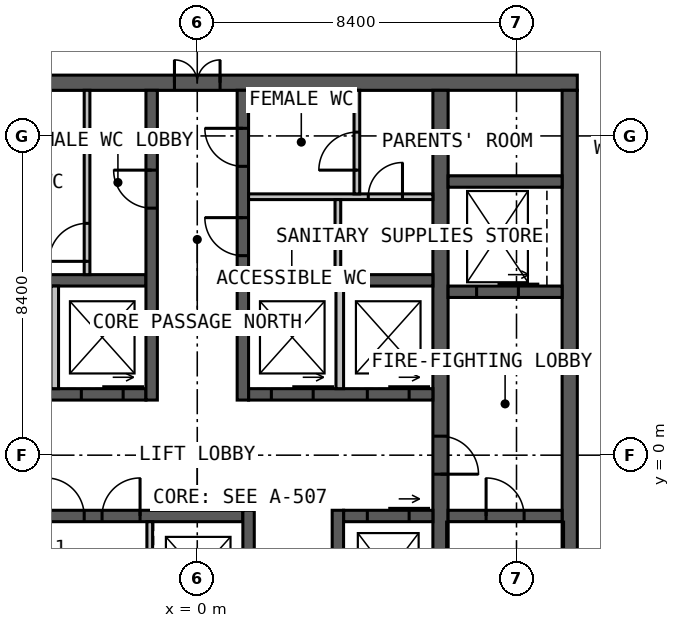
"""IFC4 building model, lengths in metres.
Left out: names, types, materials, properties, quantities, classifications, styles, units other than length and angle.
Written with IfcOpenShell. Run it as: python <this file> out.ifc"""

import sys

from ifc_helpers import new_model, si_unit, direction, frame, frame_2d, origin, place, context, subcontext, project, spatial, rectangle, extrude, element, fill, save


model = new_model("IFC4")
c1 = context("Model", 3, precision=1e-05, world=origin(), true_north=direction((0.0, 1.0)))
c2 = subcontext(c1, "Body", "Model", "MODEL_VIEW")
j1 = project(units=[si_unit("LENGTHUNIT", "METRE"), si_unit("PLANEANGLEUNIT", "RADIAN")], contexts=[c1])
p1 = place(None, origin())
s1 = spatial("IfcSite", under=j1, at=p1, CompositionType="ELEMENT")
p2 = place(p1, origin())
s2 = spatial("IfcBuilding", under=s1, at=p2, CompositionType="ELEMENT")
p3 = place(p2, frame((0.0, 0.0, 272.0)))
s3 = spatial("IfcBuildingStorey", under=s2, at=p3, CompositionType="ELEMENT", Elevation=272.0)
p4 = place(p3, frame((-10.0, 9.8, 0.0), z_axis=(0.0, 0.0, 1.0), x_axis=(1.0, 0.0, 0.0)))
e1 = element("IfcWall", 1, at=p4, inside=s3, PredefinedType="SOLIDWALL", context=c2, shape_type="SweptSolid", body=[
    extrude(rectangle(XDim=20.0, YDim=0.4, at=frame_2d((10.0, 0.0))), origin(), (0.0, 0.0, 1.0), 4.0),
])
p5 = place(p4, frame((9.4, 0.0, 0.0)))
e2 = element("IfcOpeningElement", 2, at=p5, cuts=e1, PredefinedType="OPENING", context=c2, shape_type="SweptSolid", body=[
    extrude(rectangle(XDim=1.2, YDim=2.2, at=frame_2d((0.6, 1.1))), frame((0.0, 0.21, 0.0), z_axis=(0.0, -1.0, 0.0), x_axis=(1.0, 0.0, 0.0)), (0.0, 0.0, 1.0), 0.42),
])
p6 = place(p3, frame((9.8, -9.6, 0.0), z_axis=(0.0, 0.0, 1.0), x_axis=(0.0, 1.0, 0.0)))
e3 = element("IfcWall", 3, at=p6, inside=s3, PredefinedType="SOLIDWALL", context=c2, shape_type="SweptSolid", body=[
    extrude(rectangle(XDim=19.2, YDim=0.4, at=frame_2d((9.6, 0.0))), origin(), (0.0, 0.0, 1.0), 4.0),
])
p7 = place(p3, frame((6.4, 9.6, 0.0), z_axis=(0.0, 0.0, 1.0), x_axis=(0.0, -1.0, 0.0)))
e4 = element("IfcWall", 4, at=p7, inside=s3, PredefinedType="SOLIDWALL", context=c2, shape_type="SweptSolid", body=[
    extrude(rectangle(XDim=19.2, YDim=0.4, at=frame_2d((9.6, 0.0))), origin(), (0.0, 0.0, 1.0), 4.0),
])
p8 = place(p7, frame((9.1, 0.0, 0.0)))
e5 = element("IfcOpeningElement", 5, at=p8, cuts=e4, PredefinedType="OPENING", context=c2, shape_type="SweptSolid", body=[
    extrude(rectangle(XDim=1.0, YDim=2.2, at=frame_2d((0.5, 1.1))), frame((0.0, 0.21, 0.0), z_axis=(0.0, -1.0, 0.0), x_axis=(1.0, 0.0, 0.0)), (0.0, 0.0, 1.0), 0.42),
])
p9 = place(p3, frame((-6.2, 1.6, 0.0), z_axis=(0.0, 0.0, 1.0), x_axis=(1.0, 0.0, 0.0)))
e6 = element("IfcWall", 6, at=p9, inside=s3, PredefinedType="SOLIDWALL", context=c2, shape_type="SweptSolid", body=[
    extrude(rectangle(XDim=4.85, YDim=0.3, at=frame_2d((2.425, 0.0))), origin(), (0.0, 0.0, 1.0), 4.0),
])
p10 = place(p9, frame((0.625, 0.0, 0.0)))
e7 = element("IfcOpeningElement", 7, at=p10, cuts=e6, PredefinedType="OPENING", context=c2, shape_type="SweptSolid", body=[
    extrude(rectangle(XDim=1.1, YDim=2.2, at=frame_2d((0.55, 1.1))), frame((0.0, 0.16, 0.0), z_axis=(0.0, -1.0, 0.0), x_axis=(1.0, 0.0, 0.0)), (0.0, 0.0, 1.0), 0.32),
])
p11 = place(p9, frame((3.15, 0.0, 0.0)))
e8 = element("IfcOpeningElement", 8, at=p11, cuts=e6, PredefinedType="OPENING", context=c2, shape_type="SweptSolid", body=[
    extrude(rectangle(XDim=1.1, YDim=2.2, at=frame_2d((0.55, 1.1))), frame((0.0, 0.16, 0.0), z_axis=(0.0, -1.0, 0.0), x_axis=(1.0, 0.0, 0.0)), (0.0, 0.0, 1.0), 0.32),
])
p12 = place(p3, frame((1.35, 1.6, 0.0), z_axis=(0.0, 0.0, 1.0), x_axis=(1.0, 0.0, 0.0)))
e9 = element("IfcWall", 9, at=p12, inside=s3, PredefinedType="SOLIDWALL", context=c2, shape_type="SweptSolid", body=[
    extrude(rectangle(XDim=4.85, YDim=0.3, at=frame_2d((2.425, 0.0))), origin(), (0.0, 0.0, 1.0), 4.0),
])
p13 = place(p12, frame((0.6, 0.0, 0.0)))
e10 = element("IfcOpeningElement", 10, at=p13, cuts=e9, PredefinedType="OPENING", context=c2, shape_type="SweptSolid", body=[
    extrude(rectangle(XDim=1.1, YDim=2.2, at=frame_2d((0.55, 1.1))), frame((0.0, 0.16, 0.0), z_axis=(0.0, -1.0, 0.0), x_axis=(1.0, 0.0, 0.0)), (0.0, 0.0, 1.0), 0.32),
])
p14 = place(p12, frame((3.125, 0.0, 0.0)))
e11 = element("IfcOpeningElement", 11, at=p14, cuts=e9, PredefinedType="OPENING", context=c2, shape_type="SweptSolid", body=[
    extrude(rectangle(XDim=1.1, YDim=2.2, at=frame_2d((0.55, 1.1))), frame((0.0, 0.16, 0.0), z_axis=(0.0, -1.0, 0.0), x_axis=(1.0, 0.0, 0.0)), (0.0, 0.0, 1.0), 0.32),
])
for number, where, z_axis, x_axis in (
    (12, (-6.2, 4.6, 0.0), (0.0, 0.0, 1.0), (1.0, 0.0, 0.0)),
    (13, (1.35, 4.6, 0.0), (0.0, 0.0, 1.0), (1.0, 0.0, 0.0)),
):
    element("IfcWall", number, at=place(p3, frame(where, z_axis=z_axis, x_axis=x_axis)), inside=s3, PredefinedType="SOLIDWALL", context=c2, shape_type="SweptSolid", body=[
        extrude(rectangle(XDim=4.85, YDim=0.3, at=frame_2d((2.425, 0.0))), origin(), (0.0, 0.0, 1.0), 4.0),
    ])
p15 = place(p3, frame((-1.2, 1.45, 0.0), z_axis=(0.0, 0.0, 1.0), x_axis=(0.0, 1.0, 0.0)))
e14 = element("IfcWall", 14, at=p15, inside=s3, PredefinedType="SOLIDWALL", context=c2, shape_type="SweptSolid", body=[
    extrude(rectangle(XDim=8.15, YDim=0.3, at=frame_2d((4.075, 0.0))), origin(), (0.0, 0.0, 1.0), 4.0),
])
p16 = place(p15, frame((5.05, 0.0, 0.0)))
e15 = element("IfcOpeningElement", 15, at=p16, cuts=e14, PredefinedType="OPENING", context=c2, shape_type="SweptSolid", body=[
    extrude(rectangle(XDim=1.0, YDim=2.2, at=frame_2d((0.5, 1.1))), frame((0.0, 0.16, 0.0), z_axis=(0.0, -1.0, 0.0), x_axis=(1.0, 0.0, 0.0)), (0.0, 0.0, 1.0), 0.32),
])
p17 = place(p3, frame((1.2, 1.45, 0.0), z_axis=(0.0, 0.0, 1.0), x_axis=(0.0, 1.0, 0.0)))
e16 = element("IfcWall", 16, at=p17, inside=s3, PredefinedType="SOLIDWALL", context=c2, shape_type="SweptSolid", body=[
    extrude(rectangle(XDim=8.15, YDim=0.3, at=frame_2d((4.075, 0.0))), origin(), (0.0, 0.0, 1.0), 4.0),
])
p18 = place(p17, frame((3.8, 0.0, 0.0)))
e17 = element("IfcOpeningElement", 17, at=p18, cuts=e16, PredefinedType="OPENING", context=c2, shape_type="SweptSolid", body=[
    extrude(rectangle(XDim=1.0, YDim=2.2, at=frame_2d((0.5, 1.1))), frame((0.0, 0.16, 0.0), z_axis=(0.0, -1.0, 0.0), x_axis=(1.0, 0.0, 0.0)), (0.0, 0.0, 1.0), 0.32),
])
p19 = place(p17, frame((6.15, 0.0, 0.0)))
e18 = element("IfcOpeningElement", 18, at=p19, cuts=e16, PredefinedType="OPENING", context=c2, shape_type="SweptSolid", body=[
    extrude(rectangle(XDim=1.0, YDim=2.2, at=frame_2d((0.5, 1.1))), frame((0.0, 0.16, 0.0), z_axis=(0.0, -1.0, 0.0), x_axis=(1.0, 0.0, 0.0)), (0.0, 0.0, 1.0), 0.32),
])
p20 = place(p3, frame((-6.2, -1.6, 0.0), z_axis=(0.0, 0.0, 1.0), x_axis=(1.0, 0.0, 0.0)))
e19 = element("IfcWall", 19, at=p20, inside=s3, PredefinedType="SOLIDWALL", context=c2, shape_type="SweptSolid", body=[
    extrude(rectangle(XDim=7.4, YDim=0.3, at=frame_2d((3.7, 0.0))), origin(), (0.0, 0.0, 1.0), 4.0),
])
p21 = place(p20, frame((0.675, 0.0, 0.0)))
e20 = element("IfcOpeningElement", 20, at=p21, cuts=e19, PredefinedType="OPENING", context=c2, shape_type="SweptSolid", body=[
    extrude(rectangle(XDim=1.0, YDim=2.2, at=frame_2d((0.5, 1.1))), frame((0.0, 0.16, 0.0), z_axis=(0.0, -1.0, 0.0), x_axis=(1.0, 0.0, 0.0)), (0.0, 0.0, 1.0), 0.32),
])
p22 = place(p20, frame((2.225, 0.0, 0.0)))
e21 = element("IfcOpeningElement", 21, at=p22, cuts=e19, PredefinedType="OPENING", context=c2, shape_type="SweptSolid", body=[
    extrude(rectangle(XDim=1.0, YDim=2.2, at=frame_2d((0.5, 1.1))), frame((0.0, 0.16, 0.0), z_axis=(0.0, -1.0, 0.0), x_axis=(1.0, 0.0, 0.0)), (0.0, 0.0, 1.0), 0.32),
])
p23 = place(p20, frame((3.695, 0.0, 0.0)))
e22 = element("IfcOpeningElement", 22, at=p23, cuts=e19, PredefinedType="OPENING", context=c2, shape_type="SweptSolid", body=[
    extrude(rectangle(XDim=1.0, YDim=2.2, at=frame_2d((0.5, 1.1))), frame((0.0, 0.16, 0.0), z_axis=(0.0, -1.0, 0.0), x_axis=(1.0, 0.0, 0.0)), (0.0, 0.0, 1.0), 0.32),
])
p24 = place(p3, frame((3.85, -1.6, 0.0), z_axis=(0.0, 0.0, 1.0), x_axis=(1.0, 0.0, 0.0)))
e23 = element("IfcWall", 23, at=p24, inside=s3, PredefinedType="SOLIDWALL", context=c2, shape_type="SweptSolid", body=[
    extrude(rectangle(XDim=2.35, YDim=0.3, at=frame_2d((1.175, 0.0))), origin(), (0.0, 0.0, 1.0), 4.0),
])
p25 = place(p24, frame((0.625, 0.0, 0.0)))
e24 = element("IfcOpeningElement", 24, at=p25, cuts=e23, PredefinedType="OPENING", context=c2, shape_type="SweptSolid", body=[
    extrude(rectangle(XDim=1.1, YDim=2.2, at=frame_2d((0.55, 1.1))), frame((0.0, 0.16, 0.0), z_axis=(0.0, -1.0, 0.0), x_axis=(1.0, 0.0, 0.0)), (0.0, 0.0, 1.0), 0.32),
])
p26 = place(p3, frame((1.35, -1.45, 0.0), z_axis=(0.0, 0.0, 1.0), x_axis=(0.0, -1.0, 0.0)))
e25 = element("IfcWall", 25, at=p26, inside=s3, PredefinedType="SOLIDWALL", context=c2, shape_type="SweptSolid", body=[
    extrude(rectangle(XDim=8.15, YDim=0.3, at=frame_2d((4.075, 0.0))), origin(), (0.0, 0.0, 1.0), 4.0),
])
p27 = place(p26, frame((6.0, 0.0, 0.0)))
e26 = element("IfcOpeningElement", 26, at=p27, cuts=e25, PredefinedType="OPENING", context=c2, shape_type="SweptSolid", body=[
    extrude(rectangle(XDim=1.0, YDim=2.2, at=frame_2d((0.5, 1.1))), frame((0.0, 0.16, 0.0), z_axis=(0.0, -1.0, 0.0), x_axis=(1.0, 0.0, 0.0)), (0.0, 0.0, 1.0), 0.32),
])
p28 = place(p26, frame((3.525, 0.0, 0.0)))
e27 = element("IfcOpeningElement", 27, at=p28, cuts=e25, PredefinedType="OPENING", context=c2, shape_type="SweptSolid", body=[
    extrude(rectangle(XDim=0.9, YDim=2.2, at=frame_2d((0.45, 1.1))), frame((0.0, 0.16, 0.0), z_axis=(0.0, -1.0, 0.0), x_axis=(1.0, 0.0, 0.0)), (0.0, 0.0, 1.0), 0.32),
])
p29 = place(p3, frame((3.7, -1.45, 0.0), z_axis=(0.0, 0.0, 1.0), x_axis=(0.0, -1.0, 0.0)))
e28 = element("IfcWall", 28, at=p29, inside=s3, PredefinedType="SOLIDWALL", context=c2, shape_type="SweptSolid", body=[
    extrude(rectangle(XDim=8.15, YDim=0.3, at=frame_2d((4.075, 0.0))), origin(), (0.0, 0.0, 1.0), 4.0),
])
p30 = place(p29, frame((5.1, 0.0, 0.0)))
e29 = element("IfcOpeningElement", 29, at=p30, cuts=e28, PredefinedType="OPENING", context=c2, shape_type="SweptSolid", body=[
    extrude(rectangle(XDim=0.9, YDim=2.2, at=frame_2d((0.45, 1.1))), frame((0.0, 0.16, 0.0), z_axis=(0.0, -1.0, 0.0), x_axis=(1.0, 0.0, 0.0)), (0.0, 0.0, 1.0), 0.32),
])
p31 = place(p3, frame((6.6, -1.6, 0.0), z_axis=(0.0, 0.0, 1.0), x_axis=(1.0, 0.0, 0.0)))
e30 = element("IfcWall", 30, at=p31, inside=s3, PredefinedType="SOLIDWALL", context=c2, shape_type="SweptSolid", body=[
    extrude(rectangle(XDim=3.0, YDim=0.3, at=frame_2d((1.5, 0.0))), origin(), (0.0, 0.0, 1.0), 4.0),
])
p32 = place(p31, frame((1.0, 0.0, 0.0)))
e31 = element("IfcOpeningElement", 31, at=p32, cuts=e30, PredefinedType="OPENING", context=c2, shape_type="SweptSolid", body=[
    extrude(rectangle(XDim=1.0, YDim=2.2, at=frame_2d((0.5, 1.1))), frame((0.0, 0.16, 0.0), z_axis=(0.0, -1.0, 0.0), x_axis=(1.0, 0.0, 0.0)), (0.0, 0.0, 1.0), 0.32),
])
p33 = place(p3, frame((6.6, 4.3, 0.0), z_axis=(0.0, 0.0, 1.0), x_axis=(1.0, 0.0, 0.0)))
e32 = element("IfcWall", 32, at=p33, inside=s3, PredefinedType="SOLIDWALL", context=c2, shape_type="SweptSolid", body=[
    extrude(rectangle(XDim=3.0, YDim=0.3, at=frame_2d((1.5, 0.0))), origin(), (0.0, 0.0, 1.0), 4.0),
])
p34 = place(p33, frame((0.75, 0.0, 0.0)))
e33 = element("IfcOpeningElement", 33, at=p34, cuts=e32, PredefinedType="OPENING", context=c2, shape_type="SweptSolid", body=[
    extrude(rectangle(XDim=1.1, YDim=2.2, at=frame_2d((0.55, 1.1))), frame((0.0, 0.16, 0.0), z_axis=(0.0, -1.0, 0.0), x_axis=(1.0, 0.0, 0.0)), (0.0, 0.0, 1.0), 0.32),
])
p35 = place(p3, frame((6.6, 7.2, 0.0), z_axis=(0.0, 0.0, 1.0), x_axis=(1.0, 0.0, 0.0)))
e34 = element("IfcWall", 34, at=p35, inside=s3, PredefinedType="SOLIDWALL", context=c2, shape_type="SweptSolid", body=[
    extrude(rectangle(XDim=3.0, YDim=0.3, at=frame_2d((1.5, 0.0))), origin(), (0.0, 0.0, 1.0), 4.0),
])
for number, where, z_axis, x_axis in (
    (35, (-3.75, 1.75, 0.0), (0.0, 0.0, 1.0), (0.0, 1.0, 0.0)),
    (36, (3.75, 1.75, 0.0), (0.0, 0.0, 1.0), (0.0, 1.0, 0.0)),
):
    element("IfcWall", number, at=place(p3, frame(where, z_axis=z_axis, x_axis=x_axis)), inside=s3, PredefinedType="SOLIDWALL", context=c2, shape_type="SweptSolid", body=[
        extrude(rectangle(XDim=2.7, YDim=0.2, at=frame_2d((1.35, 0.0))), origin(), (0.0, 0.0, 1.0), 3.75),
    ])
p36 = place(p3, frame((1.35, 6.8, 0.0), z_axis=(0.0, 0.0, 1.0), x_axis=(1.0, 0.0, 0.0)))
e37 = element("IfcWall", 37, at=p36, inside=s3, PredefinedType="PARTITIONING", context=c2, shape_type="SweptSolid", body=[
    extrude(rectangle(XDim=4.85, YDim=0.15, at=frame_2d((2.425, 0.0))), origin(), (0.0, 0.0, 1.0), 3.75),
])
p37 = place(p36, frame((3.15, 0.0, 0.0)))
e38 = element("IfcOpeningElement", 38, at=p37, cuts=e37, PredefinedType="OPENING", context=c2, shape_type="SweptSolid", body=[
    extrude(rectangle(XDim=0.9, YDim=2.2, at=frame_2d((0.45, 1.1))), frame((0.0, 0.085, 0.0), z_axis=(0.0, -1.0, 0.0), x_axis=(1.0, 0.0, 0.0)), (0.0, 0.0, 1.0), 0.17),
])
p38 = place(p3, frame((3.7, 4.75, 0.0), z_axis=(0.0, 0.0, 1.0), x_axis=(0.0, 1.0, 0.0)))
e39 = element("IfcWall", 39, at=p38, inside=s3, PredefinedType="PARTITIONING", context=c2, shape_type="SweptSolid", body=[
    extrude(rectangle(XDim=1.975, YDim=0.15, at=frame_2d((0.988, 0.0))), origin(), (0.0, 0.0, 1.0), 3.75),
])
p39 = place(p3, frame((4.2, 6.875, 0.0), z_axis=(0.0, 0.0, 1.0), x_axis=(0.0, 1.0, 0.0)))
e40 = element("IfcWall", 40, at=p39, inside=s3, PredefinedType="PARTITIONING", context=c2, shape_type="SweptSolid", body=[
    extrude(rectangle(XDim=2.725, YDim=0.15, at=frame_2d((1.363, 0.0))), origin(), (0.0, 0.0, 1.0), 3.75),
])
p40 = place(p39, frame((0.625, 0.0, 0.0)))
e41 = element("IfcOpeningElement", 41, at=p40, cuts=e40, PredefinedType="OPENING", context=c2, shape_type="SweptSolid", body=[
    extrude(rectangle(XDim=1.0, YDim=2.2, at=frame_2d((0.5, 1.1))), frame((0.0, 0.085, 0.0), z_axis=(0.0, -1.0, 0.0), x_axis=(1.0, 0.0, 0.0)), (0.0, 0.0, 1.0), 0.17),
])
p41 = place(p3, frame((-2.9, 4.75, 0.0), z_axis=(0.0, 0.0, 1.0), x_axis=(0.0, 1.0, 0.0)))
e42 = element("IfcWall", 42, at=p41, inside=s3, PredefinedType="PARTITIONING", context=c2, shape_type="SweptSolid", body=[
    extrude(rectangle(XDim=4.85, YDim=0.15, at=frame_2d((2.425, 0.0))), origin(), (0.0, 0.0, 1.0), 3.75),
])
p42 = place(p41, frame((0.35, 0.0, 0.0)))
e43 = element("IfcOpeningElement", 43, at=p42, cuts=e42, PredefinedType="OPENING", context=c2, shape_type="SweptSolid", body=[
    extrude(rectangle(XDim=1.0, YDim=2.2, at=frame_2d((0.5, 1.1))), frame((0.0, 0.085, 0.0), z_axis=(0.0, -1.0, 0.0), x_axis=(1.0, 0.0, 0.0)), (0.0, 0.0, 1.0), 0.17),
])
p43 = place(p3, frame((-1.25, -1.75, 0.0), z_axis=(0.0, 0.0, 1.0), x_axis=(0.0, -1.0, 0.0)))
e44 = element("IfcWall", 44, at=p43, inside=s3, PredefinedType="PARTITIONING", context=c2, shape_type="SweptSolid", body=[
    extrude(rectangle(XDim=2.7, YDim=0.15, at=frame_2d((1.35, 0.0))), origin(), (0.0, 0.0, 1.0), 3.75),
])
p44 = place(p5, origin())
e45 = element("IfcDoor", 45, at=p44, inside=s3, OperationType="DOUBLE_DOOR_SINGLE_SWING", PredefinedType="DOOR", context=c2, shape_type="SweptSolid", body=[
    extrude(rectangle(XDim=1.2, YDim=2.2, at=frame_2d((0.6, 1.1))), frame((0.0, 0.025, 0.0), z_axis=(0.0, -1.0, 0.0), x_axis=(1.0, 0.0, 0.0)), (0.0, 0.0, 1.0), 0.05),
])
fill(e2, e45)
p45 = place(p8, origin())
e46 = element("IfcDoor", 46, at=p45, inside=s3, OperationType="SINGLE_SWING_RIGHT", PredefinedType="DOOR", context=c2, shape_type="SweptSolid", body=[
    extrude(rectangle(XDim=1.0, YDim=2.2, at=frame_2d((0.5, 1.1))), frame((0.0, 0.025, 0.0), z_axis=(0.0, -1.0, 0.0), x_axis=(1.0, 0.0, 0.0)), (0.0, 0.0, 1.0), 0.05),
])
fill(e5, e46)
p46 = place(p32, origin())
e47 = element("IfcDoor", 47, at=p46, inside=s3, OperationType="SINGLE_SWING_LEFT", PredefinedType="DOOR", context=c2, shape_type="SweptSolid", body=[
    extrude(rectangle(XDim=1.0, YDim=2.2, at=frame_2d((0.5, 1.1))), frame((0.0, 0.025, 0.0), z_axis=(0.0, -1.0, 0.0), x_axis=(1.0, 0.0, 0.0)), (0.0, 0.0, 1.0), 0.05),
])
fill(e31, e47)
p47 = place(p16, origin())
e48 = element("IfcDoor", 48, at=p47, inside=s3, OperationType="SINGLE_SWING_RIGHT", PredefinedType="DOOR", context=c2, shape_type="SweptSolid", body=[
    extrude(rectangle(XDim=1.0, YDim=2.2, at=frame_2d((0.5, 1.1))), frame((0.0, 0.025, 0.0), z_axis=(0.0, -1.0, 0.0), x_axis=(1.0, 0.0, 0.0)), (0.0, 0.0, 1.0), 0.05),
])
fill(e15, e48)
p48 = place(p18, origin())
e49 = element("IfcDoor", 49, at=p48, inside=s3, OperationType="SINGLE_SWING_RIGHT", PredefinedType="DOOR", context=c2, shape_type="SweptSolid", body=[
    extrude(rectangle(XDim=1.0, YDim=2.2, at=frame_2d((0.5, 1.1))), frame((0.0, 0.025, 0.0), z_axis=(0.0, -1.0, 0.0), x_axis=(1.0, 0.0, 0.0)), (0.0, 0.0, 1.0), 0.05),
])
fill(e17, e49)
p49 = place(p19, origin())
e50 = element("IfcDoor", 50, at=p49, inside=s3, OperationType="SINGLE_SWING_RIGHT", PredefinedType="DOOR", context=c2, shape_type="SweptSolid", body=[
    extrude(rectangle(XDim=1.0, YDim=2.2, at=frame_2d((0.5, 1.1))), frame((0.0, 0.025, 0.0), z_axis=(0.0, -1.0, 0.0), x_axis=(1.0, 0.0, 0.0)), (0.0, 0.0, 1.0), 0.05),
])
fill(e18, e50)
p50 = place(p37, origin())
e51 = element("IfcDoor", 51, at=p50, inside=s3, OperationType="SINGLE_SWING_RIGHT", PredefinedType="DOOR", context=c2, shape_type="SweptSolid", body=[
    extrude(rectangle(XDim=0.9, YDim=2.2, at=frame_2d((0.45, 1.1))), frame((0.0, 0.025, 0.0), z_axis=(0.0, -1.0, 0.0), x_axis=(1.0, 0.0, 0.0)), (0.0, 0.0, 1.0), 0.05),
])
fill(e38, e51)
p51 = place(p40, origin())
e52 = element("IfcDoor", 52, at=p51, inside=s3, OperationType="SINGLE_SWING_LEFT", PredefinedType="DOOR", context=c2, shape_type="SweptSolid", body=[
    extrude(rectangle(XDim=1.0, YDim=2.2, at=frame_2d((0.5, 1.1))), frame((0.0, 0.025, 0.0), z_axis=(0.0, -1.0, 0.0), x_axis=(1.0, 0.0, 0.0)), (0.0, 0.0, 1.0), 0.05),
])
fill(e41, e52)
p52 = place(p42, origin())
e53 = element("IfcDoor", 53, at=p52, inside=s3, OperationType="SINGLE_SWING_LEFT", PredefinedType="DOOR", context=c2, shape_type="SweptSolid", body=[
    extrude(rectangle(XDim=1.0, YDim=2.2, at=frame_2d((0.5, 1.1))), frame((0.0, 0.025, 0.0), z_axis=(0.0, -1.0, 0.0), x_axis=(1.0, 0.0, 0.0)), (0.0, 0.0, 1.0), 0.05),
])
fill(e43, e53)
p53 = place(p22, origin())
e54 = element("IfcDoor", 54, at=p53, inside=s3, OperationType="SINGLE_SWING_LEFT", PredefinedType="DOOR", context=c2, shape_type="SweptSolid", body=[
    extrude(rectangle(XDim=1.0, YDim=2.2, at=frame_2d((0.5, 1.1))), frame((0.0, 0.025, 0.0), z_axis=(0.0, -1.0, 0.0), x_axis=(1.0, 0.0, 0.0)), (0.0, 0.0, 1.0), 0.05),
])
fill(e21, e54)
p54 = place(p23, origin())
e55 = element("IfcDoor", 55, at=p54, inside=s3, OperationType="SINGLE_SWING_RIGHT", PredefinedType="DOOR", context=c2, shape_type="SweptSolid", body=[
    extrude(rectangle(XDim=1.0, YDim=2.2, at=frame_2d((0.5, 1.1))), frame((0.0, 0.025, 0.0), z_axis=(0.0, -1.0, 0.0), x_axis=(1.0, 0.0, 0.0)), (0.0, 0.0, 1.0), 0.05),
])
fill(e22, e55)
p55 = place(p11, origin())
e56 = element("IfcDoor", 56, at=p55, inside=s3, OperationType="SLIDING_TO_LEFT", PredefinedType="DOOR", context=c2, shape_type="SweptSolid", body=[
    extrude(rectangle(XDim=1.1, YDim=2.2, at=frame_2d((0.55, 1.1))), frame((0.0, 0.025, 0.0), z_axis=(0.0, -1.0, 0.0), x_axis=(1.0, 0.0, 0.0)), (0.0, 0.0, 1.0), 0.05),
])
fill(e8, e56)
p56 = place(p13, origin())
e57 = element("IfcDoor", 57, at=p56, inside=s3, OperationType="SLIDING_TO_LEFT", PredefinedType="DOOR", context=c2, shape_type="SweptSolid", body=[
    extrude(rectangle(XDim=1.1, YDim=2.2, at=frame_2d((0.55, 1.1))), frame((0.0, 0.025, 0.0), z_axis=(0.0, -1.0, 0.0), x_axis=(1.0, 0.0, 0.0)), (0.0, 0.0, 1.0), 0.05),
])
fill(e10, e57)
p57 = place(p14, origin())
e58 = element("IfcDoor", 58, at=p57, inside=s3, OperationType="SLIDING_TO_LEFT", PredefinedType="DOOR", context=c2, shape_type="SweptSolid", body=[
    extrude(rectangle(XDim=1.1, YDim=2.2, at=frame_2d((0.55, 1.1))), frame((0.0, 0.025, 0.0), z_axis=(0.0, -1.0, 0.0), x_axis=(1.0, 0.0, 0.0)), (0.0, 0.0, 1.0), 0.05),
])
fill(e11, e58)
p58 = place(p25, origin())
e59 = element("IfcDoor", 59, at=p58, inside=s3, OperationType="SLIDING_TO_LEFT", PredefinedType="DOOR", context=c2, shape_type="SweptSolid", body=[
    extrude(rectangle(XDim=1.1, YDim=2.2, at=frame_2d((0.55, 1.1))), frame((0.0, 0.025, 0.0), z_axis=(0.0, -1.0, 0.0), x_axis=(1.0, 0.0, 0.0)), (0.0, 0.0, 1.0), 0.05),
])
fill(e24, e59)
p59 = place(p34, origin())
e60 = element("IfcDoor", 60, at=p59, inside=s3, OperationType="SLIDING_TO_LEFT", PredefinedType="DOOR", context=c2, shape_type="SweptSolid", body=[
    extrude(rectangle(XDim=1.1, YDim=2.2, at=frame_2d((0.55, 1.1))), frame((0.0, 0.025, 0.0), z_axis=(0.0, -1.0, 0.0), x_axis=(1.0, 0.0, 0.0)), (0.0, 0.0, 1.0), 0.05),
])
fill(e33, e60)
save(model, sys.argv[1])
